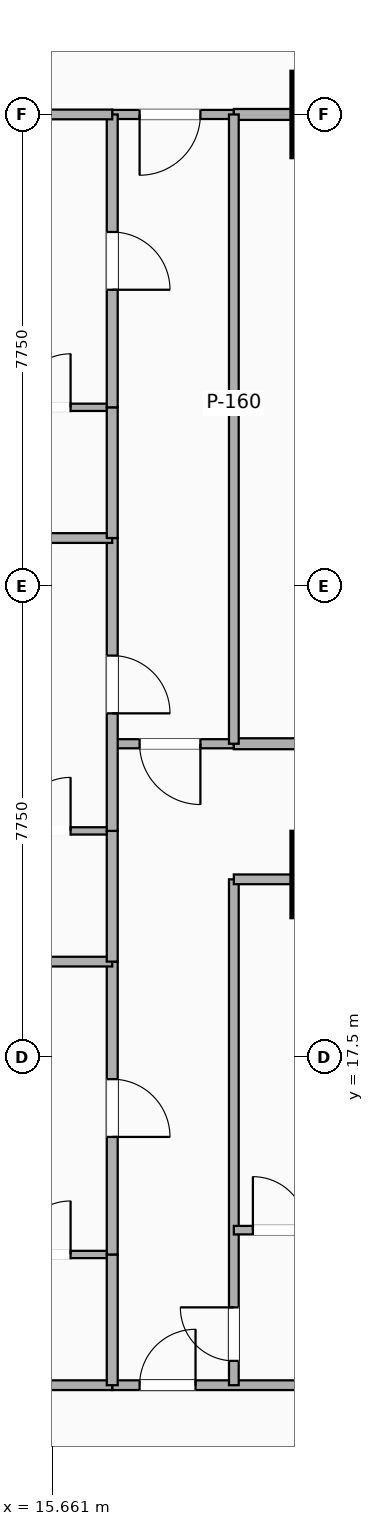
"""IFC4 building model, lengths in metres.
Left out: names, types, materials, properties, quantities, classifications, styles, units other than length and angle.
Written with IfcOpenShell. Run it as: python <this file> out.ifc"""

import sys

from ifc_helpers import new_model, si_unit, direction, frame, frame_2d, origin, origin_2d, place, context, subcontext, project, spatial, rectangle, extrude, element, fill, save


model = new_model("IFC4")
c1 = context("Model", 3, precision=1e-05, world=origin(), true_north=direction((0.0, 1.0)))
c2 = subcontext(c1, "Body", "Model", "MODEL_VIEW")
j1 = project(units=[si_unit("LENGTHUNIT", "METRE"), si_unit("PLANEANGLEUNIT", "RADIAN")], contexts=[c1])
p1 = place(None, origin())
s1 = spatial("IfcSite", under=j1, at=p1, CompositionType="ELEMENT")
p2 = place(p1, origin())
s2 = spatial("IfcBuilding", under=s1, at=p2, CompositionType="ELEMENT")
p3 = place(p2, frame((0.0, 0.0, 71.9)))
s3 = spatial("IfcBuildingStorey", under=s2, at=p3, CompositionType="ELEMENT", Elevation=71.9)
for number, where, z_axis, x_axis in (
    (1, (20.3, 20.5, -0.28), (0.0, 0.0, 1.0), (1.0, 0.0, 0.0)),
    (2, (20.3, 33.0, -0.28), (0.0, 0.0, 1.0), (1.0, 0.0, 0.0)),
):
    element("IfcColumn", number, at=place(p3, frame(where, z_axis=z_axis, x_axis=x_axis)), inside=s3, PredefinedType="COLUMN", context=c2, shape_type="SweptSolid", body=[
        extrude(rectangle(XDim=1.4, YDim=1.4, at=origin_2d()), origin(), (0.0, 0.0, 1.0), 3.46),
    ])
p4 = place(p3, frame((16.65, 12.1, 0.0), z_axis=(0.0, 0.0, 1.0), x_axis=(1.0, 0.0, 0.0)))
e3 = element("IfcWall", 3, at=p4, inside=s3, PredefinedType="PARTITIONING", context=c2, shape_type="SweptSolid", body=[
    extrude(rectangle(XDim=3.65, YDim=0.16, at=frame_2d((1.825, 0.0))), origin(), (0.0, 0.0, 1.0), 2.47),
])
p5 = place(p4, frame((1.37, 0.0, 0.0), z_axis=(0.0, 0.0, 1.0), x_axis=(-1.0, 0.0, 0.0)))
e4 = element("IfcOpeningElement", 4, at=p5, cuts=e3, PredefinedType="OPENING", context=c2, shape_type="SweptSolid", body=[
    extrude(rectangle(XDim=0.92, YDim=2.08, at=frame_2d((0.46, 1.04))), frame((0.0, 0.09, 0.0), z_axis=(0.0, -1.0, 0.0), x_axis=(1.0, 0.0, 0.0)), (0.0, 0.0, 1.0), 0.18),
])
p6 = place(p3, frame((18.65, 12.1, 0.0), z_axis=(0.0, 0.0, 1.0), x_axis=(0.0, 1.0, 0.0)))
e5 = element("IfcWall", 5, at=p6, inside=s3, PredefinedType="PARTITIONING", context=c2, shape_type="SweptSolid", body=[
    extrude(rectangle(XDim=8.32, YDim=0.16, at=frame_2d((4.16, 0.0))), origin(), (0.0, 0.0, 1.0), 2.47),
])
p7 = place(p6, frame((1.28, 0.0, 0.0), z_axis=(0.0, 0.0, 1.0), x_axis=(-1.0, 0.0, 0.0)))
e6 = element("IfcOpeningElement", 6, at=p7, cuts=e5, PredefinedType="OPENING", context=c2, shape_type="SweptSolid", body=[
    extrude(rectangle(XDim=0.88, YDim=2.08, at=frame_2d((0.44, 1.04))), frame((0.0, 0.09, 0.0), z_axis=(0.0, -1.0, 0.0), x_axis=(1.0, 0.0, 0.0)), (0.0, 0.0, 1.0), 0.18),
])
p8 = place(p3, frame((18.65, 20.42, 0.0), z_axis=(0.0, 0.0, 1.0), x_axis=(1.0, 0.0, 0.0)))
e7 = element("IfcWall", 7, at=p8, inside=s3, PredefinedType="PARTITIONING", context=c2, shape_type="SweptSolid", body=[
    extrude(rectangle(XDim=1.65, YDim=0.16, at=frame_2d((0.825, 0.0))), origin(), (0.0, 0.0, 1.0), 2.47),
])
p9 = place(p3, frame((16.65, 22.65, 0.0), z_axis=(0.0, 0.0, 1.0), x_axis=(1.0, 0.0, 0.0)))
e8 = element("IfcWall", 8, at=p9, inside=s3, PredefinedType="PARTITIONING", context=c2, shape_type="SweptSolid", body=[
    extrude(rectangle(XDim=2.0, YDim=0.15, at=frame_2d((1.0, 0.0))), origin(), (0.0, 0.0, 1.0), 3.18),
])
p10 = place(p9, frame((0.45, 0.0, 0.0)))
e9 = element("IfcOpeningElement", 9, at=p10, cuts=e8, PredefinedType="OPENING", context=c2, shape_type="SweptSolid", body=[
    extrude(rectangle(XDim=1.0, YDim=2.15, at=frame_2d((0.5, 1.075))), frame((0.0, 0.085, 0.0), z_axis=(0.0, -1.0, 0.0), x_axis=(1.0, 0.0, 0.0)), (0.0, 0.0, 1.0), 0.17),
])
p11 = place(p3, frame((16.65, 33.0, 0.0), z_axis=(0.0, 0.0, 1.0), x_axis=(1.0, 0.0, 0.0)))
e10 = element("IfcWall", 10, at=p11, inside=s3, PredefinedType="PARTITIONING", context=c2, shape_type="SweptSolid", body=[
    extrude(rectangle(XDim=2.0, YDim=0.15, at=frame_2d((1.0, 0.0))), origin(), (0.0, 0.0, 1.0), 2.47),
])
p12 = place(p11, frame((0.45, 0.0, 0.0)))
e11 = element("IfcOpeningElement", 11, at=p12, cuts=e10, PredefinedType="OPENING", context=c2, shape_type="SweptSolid", body=[
    extrude(rectangle(XDim=1.0, YDim=2.15, at=frame_2d((0.5, 1.075))), frame((0.0, 0.085, 0.0), z_axis=(0.0, -1.0, 0.0), x_axis=(1.0, 0.0, 0.0)), (0.0, 0.0, 1.0), 0.17),
])
p13 = place(p3, frame((18.65, 22.65, 0.0), z_axis=(0.0, 0.0, 1.0), x_axis=(1.0, 0.0, 0.0)))
e12 = element("IfcWall", 12, at=p13, inside=s3, PredefinedType="PARTITIONING", context=c2, shape_type="SweptSolid", body=[
    extrude(rectangle(XDim=7.85, YDim=0.18, at=frame_2d((3.925, 0.0))), origin(), (0.0, 0.0, 1.0), 2.47),
])
p14 = place(p13, frame((3.45, 0.0, 0.0)))
e13 = element("IfcOpeningElement", 13, at=p14, cuts=e12, PredefinedType="OPENING", context=c2, shape_type="SweptSolid", body=[
    extrude(rectangle(XDim=0.95, YDim=2.15, at=frame_2d((0.475, 1.075))), frame((0.0, 0.1, 0.0), z_axis=(0.0, -1.0, 0.0), x_axis=(1.0, 0.0, 0.0)), (0.0, 0.0, 1.0), 0.2),
])
p15 = place(p3, frame((18.65, 33.0, 0.0), z_axis=(0.0, 0.0, 1.0), x_axis=(1.0, 0.0, 0.0)))
e14 = element("IfcWall", 14, at=p15, inside=s3, PredefinedType="PARTITIONING", context=c2, shape_type="SweptSolid", body=[
    extrude(rectangle(XDim=7.85, YDim=0.18, at=frame_2d((3.925, 0.0))), origin(), (0.0, 0.0, 1.0), 2.47),
])
p16 = place(p3, frame((18.65, 22.65, 0.0), z_axis=(0.0, 0.0, 1.0), x_axis=(0.0, 1.0, 0.0)))
e15 = element("IfcWall", 15, at=p16, inside=s3, PredefinedType="PARTITIONING", context=c2, shape_type="SweptSolid", body=[
    extrude(rectangle(XDim=10.35, YDim=0.16, at=frame_2d((5.175, 0.0))), origin(), (0.0, 0.0, 1.0), 2.47),
])
p17 = place(p3, frame((11.47, 12.1, 0.0), z_axis=(0.0, 0.0, 1.0), x_axis=(1.0, 0.0, 0.0)))
e16 = element("IfcWall", 16, at=p17, inside=s3, PredefinedType="PARTITIONING", context=c2, shape_type="SweptSolid", body=[
    extrude(rectangle(XDim=5.18, YDim=0.16, at=frame_2d((2.59, 0.0))), origin(), (0.0, 0.0, 1.0), 2.543),
])
p18 = place(p3, frame((14.4, 14.25, 0.0), z_axis=(0.0, 0.0, 1.0), x_axis=(1.0, 0.0, 0.0)))
e17 = element("IfcWall", 17, at=p18, inside=s3, PredefinedType="PARTITIONING", context=c2, shape_type="SweptSolid", body=[
    extrude(rectangle(XDim=2.25, YDim=0.12, at=frame_2d((1.125, 0.0))), origin(), (0.0, 0.0, 1.0), 3.18),
])
p19 = place(p18, frame((1.565, 0.0, 0.0), z_axis=(0.0, 0.0, 1.0), x_axis=(-1.0, 0.0, 0.0)))
e18 = element("IfcOpeningElement", 18, at=p19, cuts=e17, PredefinedType="OPENING", context=c2, shape_type="SweptSolid", body=[
    extrude(rectangle(XDim=0.88, YDim=2.08, at=frame_2d((0.44, 1.04))), frame((0.0, 0.07, 0.0), z_axis=(0.0, -1.0, 0.0), x_axis=(1.0, 0.0, 0.0)), (0.0, 0.0, 1.0), 0.14),
])
p20 = place(p3, frame((16.65, 12.1, 0.0), z_axis=(0.0, 0.0, 1.0), x_axis=(0.0, 1.0, 0.0)))
e19 = element("IfcWall", 19, at=p20, inside=s3, PredefinedType="PARTITIONING", context=c2, shape_type="SweptSolid", body=[
    extrude(rectangle(XDim=2.15, YDim=0.18, at=frame_2d((1.075, 0.0))), origin(), (0.0, 0.0, 1.0), 2.862),
])
p21 = place(p3, frame((16.65, 14.25, 0.0), z_axis=(0.0, 0.0, 1.0), x_axis=(0.0, 1.0, 0.0)))
e20 = element("IfcWall", 20, at=p21, inside=s3, PredefinedType="PARTITIONING", context=c2, shape_type="SweptSolid", body=[
    extrude(rectangle(XDim=4.817, YDim=0.18, at=frame_2d((2.408, 0.0))), origin(), (0.0, 0.0, 1.0), 2.862),
])
p22 = place(p21, frame((1.933, 0.0, 0.0)))
e21 = element("IfcOpeningElement", 21, at=p22, cuts=e20, PredefinedType="OPENING", context=c2, shape_type="SweptSolid", body=[
    extrude(rectangle(XDim=0.95, YDim=2.15, at=frame_2d((0.475, 1.075))), frame((0.0, 0.1, 0.0), z_axis=(0.0, -1.0, 0.0), x_axis=(1.0, 0.0, 0.0)), (0.0, 0.0, 1.0), 0.2),
])
p23 = place(p3, frame((11.47, 19.067, 0.0), z_axis=(0.0, 0.0, 1.0), x_axis=(1.0, 0.0, 0.0)))
e22 = element("IfcWall", 22, at=p23, inside=s3, PredefinedType="PARTITIONING", context=c2, shape_type="SweptSolid", body=[
    extrude(rectangle(XDim=5.18, YDim=0.16, at=frame_2d((2.59, 0.0))), origin(), (0.0, 0.0, 1.0), 2.543),
])
p24 = place(p3, frame((14.4, 21.217, 0.0), z_axis=(0.0, 0.0, 1.0), x_axis=(1.0, 0.0, 0.0)))
e23 = element("IfcWall", 23, at=p24, inside=s3, PredefinedType="PARTITIONING", context=c2, shape_type="SweptSolid", body=[
    extrude(rectangle(XDim=2.25, YDim=0.12, at=frame_2d((1.125, 0.0))), origin(), (0.0, 0.0, 1.0), 3.18),
])
p25 = place(p24, frame((1.565, 0.0, 0.0), z_axis=(0.0, 0.0, 1.0), x_axis=(-1.0, 0.0, 0.0)))
e24 = element("IfcOpeningElement", 24, at=p25, cuts=e23, PredefinedType="OPENING", context=c2, shape_type="SweptSolid", body=[
    extrude(rectangle(XDim=0.88, YDim=2.08, at=frame_2d((0.44, 1.04))), frame((0.0, 0.07, 0.0), z_axis=(0.0, -1.0, 0.0), x_axis=(1.0, 0.0, 0.0)), (0.0, 0.0, 1.0), 0.14),
])
p26 = place(p3, frame((16.65, 19.067, 0.0), z_axis=(0.0, 0.0, 1.0), x_axis=(0.0, 1.0, 0.0)))
e25 = element("IfcWall", 25, at=p26, inside=s3, PredefinedType="PARTITIONING", context=c2, shape_type="SweptSolid", body=[
    extrude(rectangle(XDim=2.15, YDim=0.18, at=frame_2d((1.075, 0.0))), origin(), (0.0, 0.0, 1.0), 2.47),
])
p27 = place(p3, frame((16.65, 21.217, 0.0), z_axis=(0.0, 0.0, 1.0), x_axis=(0.0, 1.0, 0.0)))
e26 = element("IfcWall", 26, at=p27, inside=s3, PredefinedType="PARTITIONING", context=c2, shape_type="SweptSolid", body=[
    extrude(rectangle(XDim=4.816, YDim=0.18, at=frame_2d((2.408, 0.0))), origin(), (0.0, 0.0, 1.0), 2.748),
])
p28 = place(p27, frame((1.933, 0.0, 0.0)))
e27 = element("IfcOpeningElement", 27, at=p28, cuts=e26, PredefinedType="OPENING", context=c2, shape_type="SweptSolid", body=[
    extrude(rectangle(XDim=0.95, YDim=2.15, at=frame_2d((0.475, 1.075))), frame((0.0, 0.1, 0.0), z_axis=(0.0, -1.0, 0.0), x_axis=(1.0, 0.0, 0.0)), (0.0, 0.0, 1.0), 0.2),
])
p29 = place(p3, frame((11.47, 26.033, 0.0), z_axis=(0.0, 0.0, 1.0), x_axis=(1.0, 0.0, 0.0)))
e28 = element("IfcWall", 28, at=p29, inside=s3, PredefinedType="PARTITIONING", context=c2, shape_type="SweptSolid", body=[
    extrude(rectangle(XDim=5.18, YDim=0.16, at=frame_2d((2.59, 0.0))), origin(), (0.0, 0.0, 1.0), 2.543),
])
p30 = place(p3, frame((14.4, 28.183, 0.0), z_axis=(0.0, 0.0, 1.0), x_axis=(1.0, 0.0, 0.0)))
e29 = element("IfcWall", 29, at=p30, inside=s3, PredefinedType="PARTITIONING", context=c2, shape_type="SweptSolid", body=[
    extrude(rectangle(XDim=2.25, YDim=0.12, at=frame_2d((1.125, 0.0))), origin(), (0.0, 0.0, 1.0), 3.18),
])
p31 = place(p30, frame((1.565, 0.0, 0.0), z_axis=(0.0, 0.0, 1.0), x_axis=(-1.0, 0.0, 0.0)))
e30 = element("IfcOpeningElement", 30, at=p31, cuts=e29, PredefinedType="OPENING", context=c2, shape_type="SweptSolid", body=[
    extrude(rectangle(XDim=0.88, YDim=2.08, at=frame_2d((0.44, 1.04))), frame((0.0, 0.07, 0.0), z_axis=(0.0, -1.0, 0.0), x_axis=(1.0, 0.0, 0.0)), (0.0, 0.0, 1.0), 0.14),
])
p32 = place(p3, frame((16.65, 26.033, 0.0), z_axis=(0.0, 0.0, 1.0), x_axis=(0.0, 1.0, 0.0)))
e31 = element("IfcWall", 31, at=p32, inside=s3, PredefinedType="PARTITIONING", context=c2, shape_type="SweptSolid", body=[
    extrude(rectangle(XDim=2.15, YDim=0.18, at=frame_2d((1.075, 0.0))), origin(), (0.0, 0.0, 1.0), 3.18),
])
p33 = place(p3, frame((16.65, 28.183, 0.0), z_axis=(0.0, 0.0, 1.0), x_axis=(0.0, 1.0, 0.0)))
e32 = element("IfcWall", 32, at=p33, inside=s3, PredefinedType="PARTITIONING", context=c2, shape_type="SweptSolid", body=[
    extrude(rectangle(XDim=4.817, YDim=0.18, at=frame_2d((2.408, 0.0))), origin(), (0.0, 0.0, 1.0), 2.47),
])
p34 = place(p33, frame((1.933, 0.0, 0.0)))
e33 = element("IfcOpeningElement", 33, at=p34, cuts=e32, PredefinedType="OPENING", context=c2, shape_type="SweptSolid", body=[
    extrude(rectangle(XDim=0.95, YDim=2.15, at=frame_2d((0.475, 1.075))), frame((0.0, 0.1, 0.0), z_axis=(0.0, -1.0, 0.0), x_axis=(1.0, 0.0, 0.0)), (0.0, 0.0, 1.0), 0.2),
])
p35 = place(p3, frame((11.47, 33.0, 0.0), z_axis=(0.0, 0.0, 1.0), x_axis=(1.0, 0.0, 0.0)))
e34 = element("IfcWall", 34, at=p35, inside=s3, PredefinedType="PARTITIONING", context=c2, shape_type="SweptSolid", body=[
    extrude(rectangle(XDim=5.18, YDim=0.16, at=frame_2d((2.59, 0.0))), origin(), (0.0, 0.0, 1.0), 2.47),
])
p36 = place(p3, frame((18.65, 14.65, 0.0), z_axis=(0.0, 0.0, 1.0), x_axis=(1.0, 0.0, 0.0)))
e35 = element("IfcWall", 35, at=p36, inside=s3, PredefinedType="PARTITIONING", context=c2, shape_type="SweptSolid", body=[
    extrude(rectangle(XDim=1.6, YDim=0.14, at=frame_2d((0.8, 0.0))), origin(), (0.0, 0.0, 1.0), 2.47),
])
p37 = place(p36, frame((1.193, 0.0, 0.0), z_axis=(0.0, 0.0, 1.0), x_axis=(-1.0, 0.0, 0.0)))
e36 = element("IfcOpeningElement", 36, at=p37, cuts=e35, PredefinedType="OPENING", context=c2, shape_type="SweptSolid", body=[
    extrude(rectangle(XDim=0.88, YDim=2.08, at=frame_2d((0.44, 1.04))), frame((0.0, 0.08, 0.0), z_axis=(0.0, -1.0, 0.0), x_axis=(1.0, 0.0, 0.0)), (0.0, 0.0, 1.0), 0.16),
])
p38 = place(p5, origin())
e37 = element("IfcDoor", 37, at=p38, inside=s3, OperationType="SINGLE_SWING_RIGHT", PredefinedType="DOOR", context=c2, shape_type="SweptSolid", body=[
    extrude(rectangle(XDim=0.92, YDim=2.08, at=frame_2d((0.46, 1.04))), frame((0.0, 0.025, 0.0), z_axis=(0.0, -1.0, 0.0), x_axis=(1.0, 0.0, 0.0)), (0.0, 0.0, 1.0), 0.05),
])
fill(e4, e37)
p39 = place(p7, origin())
e38 = element("IfcDoor", 38, at=p39, inside=s3, OperationType="SINGLE_SWING_RIGHT", PredefinedType="DOOR", context=c2, shape_type="SweptSolid", body=[
    extrude(rectangle(XDim=0.88, YDim=2.08, at=frame_2d((0.44, 1.04))), frame((0.0, 0.025, 0.0), z_axis=(0.0, -1.0, 0.0), x_axis=(1.0, 0.0, 0.0)), (0.0, 0.0, 1.0), 0.05),
])
fill(e6, e38)
p40 = place(p10, origin())
e39 = element("IfcDoor", 39, at=p40, inside=s3, OperationType="SINGLE_SWING_RIGHT", PredefinedType="DOOR", context=c2, shape_type="SweptSolid", body=[
    extrude(rectangle(XDim=1.0, YDim=2.15, at=frame_2d((0.5, 1.075))), frame((0.0, 0.025, 0.0), z_axis=(0.0, -1.0, 0.0), x_axis=(1.0, 0.0, 0.0)), (0.0, 0.0, 1.0), 0.05),
])
fill(e9, e39)
p41 = place(p12, origin())
e40 = element("IfcDoor", 40, at=p41, inside=s3, OperationType="SINGLE_SWING_LEFT", PredefinedType="DOOR", context=c2, shape_type="SweptSolid", body=[
    extrude(rectangle(XDim=1.0, YDim=2.15, at=frame_2d((0.5, 1.075))), frame((0.0, 0.025, 0.0), z_axis=(0.0, -1.0, 0.0), x_axis=(1.0, 0.0, 0.0)), (0.0, 0.0, 1.0), 0.05),
])
fill(e11, e40)
p42 = place(p19, origin())
e41 = element("IfcDoor", 41, at=p42, inside=s3, OperationType="SINGLE_SWING_RIGHT", PredefinedType="DOOR", context=c2, shape_type="SweptSolid", body=[
    extrude(rectangle(XDim=0.88, YDim=2.08, at=frame_2d((0.44, 1.04))), frame((0.0, 0.025, 0.0), z_axis=(0.0, -1.0, 0.0), x_axis=(1.0, 0.0, 0.0)), (0.0, 0.0, 1.0), 0.05),
])
fill(e18, e41)
p43 = place(p22, origin())
e42 = element("IfcDoor", 42, at=p43, inside=s3, OperationType="SINGLE_SWING_LEFT", PredefinedType="DOOR", context=c2, shape_type="SweptSolid", body=[
    extrude(rectangle(XDim=0.95, YDim=2.15, at=frame_2d((0.475, 1.075))), frame((0.0, 0.025, 0.0), z_axis=(0.0, -1.0, 0.0), x_axis=(1.0, 0.0, 0.0)), (0.0, 0.0, 1.0), 0.05),
])
fill(e21, e42)
p44 = place(p25, origin())
e43 = element("IfcDoor", 43, at=p44, inside=s3, OperationType="SINGLE_SWING_RIGHT", PredefinedType="DOOR", context=c2, shape_type="SweptSolid", body=[
    extrude(rectangle(XDim=0.88, YDim=2.08, at=frame_2d((0.44, 1.04))), frame((0.0, 0.025, 0.0), z_axis=(0.0, -1.0, 0.0), x_axis=(1.0, 0.0, 0.0)), (0.0, 0.0, 1.0), 0.05),
])
fill(e24, e43)
p45 = place(p28, origin())
e44 = element("IfcDoor", 44, at=p45, inside=s3, OperationType="SINGLE_SWING_LEFT", PredefinedType="DOOR", context=c2, shape_type="SweptSolid", body=[
    extrude(rectangle(XDim=0.95, YDim=2.15, at=frame_2d((0.475, 1.075))), frame((0.0, 0.025, 0.0), z_axis=(0.0, -1.0, 0.0), x_axis=(1.0, 0.0, 0.0)), (0.0, 0.0, 1.0), 0.05),
])
fill(e27, e44)
p46 = place(p31, origin())
e45 = element("IfcDoor", 45, at=p46, inside=s3, OperationType="SINGLE_SWING_RIGHT", PredefinedType="DOOR", context=c2, shape_type="SweptSolid", body=[
    extrude(rectangle(XDim=0.88, YDim=2.08, at=frame_2d((0.44, 1.04))), frame((0.0, 0.025, 0.0), z_axis=(0.0, -1.0, 0.0), x_axis=(1.0, 0.0, 0.0)), (0.0, 0.0, 1.0), 0.05),
])
fill(e30, e45)
p47 = place(p34, origin())
e46 = element("IfcDoor", 46, at=p47, inside=s3, OperationType="SINGLE_SWING_LEFT", PredefinedType="DOOR", context=c2, shape_type="SweptSolid", body=[
    extrude(rectangle(XDim=0.95, YDim=2.15, at=frame_2d((0.475, 1.075))), frame((0.0, 0.025, 0.0), z_axis=(0.0, -1.0, 0.0), x_axis=(1.0, 0.0, 0.0)), (0.0, 0.0, 1.0), 0.05),
])
fill(e33, e46)
p48 = place(p37, origin())
e47 = element("IfcDoor", 47, at=p48, inside=s3, OperationType="SINGLE_SWING_LEFT", PredefinedType="DOOR", context=c2, shape_type="SweptSolid", body=[
    extrude(rectangle(XDim=0.88, YDim=2.08, at=frame_2d((0.44, 1.04))), frame((0.0, 0.025, 0.0), z_axis=(0.0, -1.0, 0.0), x_axis=(1.0, 0.0, 0.0)), (0.0, 0.0, 1.0), 0.05),
])
fill(e36, e47)
save(model, sys.argv[1])
